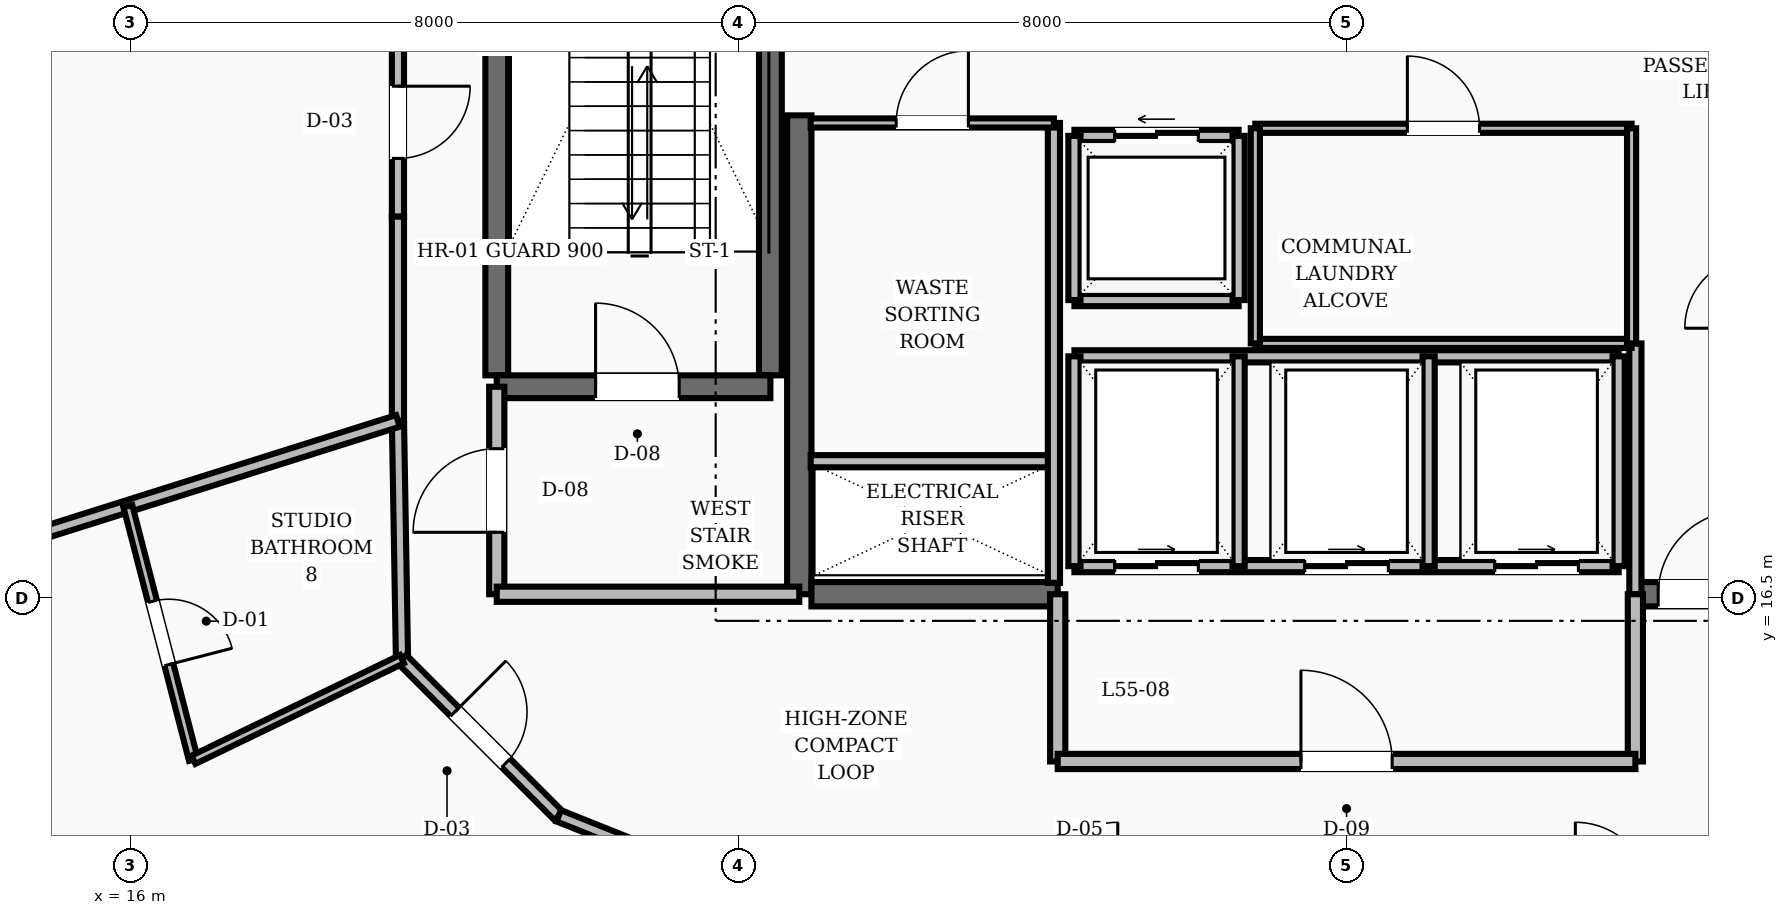
"""IFC4 building model, lengths in metres.
Left out: names, types, materials, properties, quantities, classifications, styles, units other than length and angle.
Written with IfcOpenShell. Run it as: python <this file> out.ifc"""

import sys

from ifc_helpers import new_model, si_unit, direction, frame, frame_2d, origin, place, context, subcontext, project, spatial, rectangle, extrude, element, fill, save


model = new_model("IFC4")
c1 = context("Model", 3, precision=1e-05, world=origin(), true_north=direction((0.0, 1.0)))
c2 = subcontext(c1, "Body", "Model", "MODEL_VIEW")
j1 = project(units=[si_unit("LENGTHUNIT", "METRE"), si_unit("PLANEANGLEUNIT", "RADIAN")], contexts=[c1])
p1 = place(None, origin())
s1 = spatial("IfcSite", under=j1, at=p1, CompositionType="ELEMENT")
p2 = place(p1, origin())
s2 = spatial("IfcBuilding", under=s1, at=p2, CompositionType="ELEMENT")
p3 = place(p2, frame((0.0, 0.0, 214.8)))
s3 = spatial("IfcBuildingStorey", under=s2, at=p3, CompositionType="ELEMENT", Elevation=214.8)
p4 = place(p3, frame((24.8, 16.55, 0.0), z_axis=(0.0, 0.0, 1.0), x_axis=(0.0, 1.0, 0.0)))
e1 = element("IfcWall", 1, at=p4, inside=s3, PredefinedType="SHEAR", context=c2, shape_type="SweptSolid", body=[
    extrude(rectangle(XDim=6.3, YDim=0.32, at=frame_2d((3.15, 0.0))), origin(), (0.0, 0.0, 1.0), 3.6),
])
p5 = place(p3, frame((24.96, 16.55, 0.0), z_axis=(0.0, 0.0, 1.0), x_axis=(1.0, 0.0, 0.0)))
e2 = element("IfcWall", 2, at=p5, inside=s3, PredefinedType="SHEAR", context=c2, shape_type="SweptSolid", body=[
    extrude(rectangle(XDim=3.24, YDim=0.32, at=frame_2d((1.62, 0.0))), origin(), (0.0, 0.0, 1.0), 3.6),
])
p6 = place(p3, frame((35.8, 16.55, 0.0), z_axis=(0.0, 0.0, 1.0), x_axis=(1.0, 0.0, 0.0)))
e3 = element("IfcWall", 3, at=p6, inside=s3, PredefinedType="SHEAR", context=c2, shape_type="SweptSolid", body=[
    extrude(rectangle(XDim=3.24, YDim=0.32, at=frame_2d((1.62, 0.0))), origin(), (0.0, 0.0, 1.0), 3.6),
])
p7 = place(p6, frame((0.3, 0.0, 0.0)))
e4 = element("IfcOpeningElement", 4, at=p7, cuts=e3, PredefinedType="OPENING", context=c2, shape_type="SweptSolid", body=[
    extrude(rectangle(XDim=1.1, YDim=2.1, at=frame_2d((0.55, 1.05))), frame((0.0, 0.17, 0.0), z_axis=(0.0, -1.0, 0.0), x_axis=(1.0, 0.0, 0.0)), (0.0, 0.0, 1.0), 0.34),
])
for number, where, z_axis, x_axis in (
    (5, (20.82, 19.43, 0.0), (0.0, 0.0, 1.0), (0.0, 1.0, 0.0)),
    (6, (24.42, 19.43, 0.0), (0.0, 0.0, 1.0), (0.0, 1.0, 0.0)),
):
    element("IfcWall", number, at=place(p3, frame(where, z_axis=z_axis, x_axis=x_axis)), inside=s3, PredefinedType="SHEAR", context=c2, shape_type="SweptSolid", body=[
        extrude(rectangle(XDim=8.74, YDim=0.3, at=frame_2d((4.37, 0.0))), origin(), (0.0, 0.0, 1.0), 3.6),
    ])
p8 = place(p3, frame((20.82, 19.28, 0.0), z_axis=(0.0, 0.0, 1.0), x_axis=(1.0, 0.0, 0.0)))
e7 = element("IfcWall", 7, at=p8, inside=s3, PredefinedType="SHEAR", context=c2, shape_type="SweptSolid", body=[
    extrude(rectangle(XDim=3.6, YDim=0.3, at=frame_2d((1.8, 0.0))), origin(), (0.0, 0.0, 1.0), 3.6),
])
p9 = place(p8, frame((1.3, 0.0, 0.0)))
e8 = element("IfcOpeningElement", 8, at=p9, cuts=e7, PredefinedType="OPENING", context=c2, shape_type="SweptSolid", body=[
    extrude(rectangle(XDim=1.1, YDim=2.1, at=frame_2d((0.55, 1.05))), frame((0.0, 0.16, 0.0), z_axis=(0.0, -1.0, 0.0), x_axis=(1.0, 0.0, 0.0)), (0.0, 0.0, 1.0), 0.32),
])
p10 = place(p3, frame((20.82, 16.55, 0.0), z_axis=(0.0, 0.0, 1.0), x_axis=(0.0, 1.0, 0.0)))
e9 = element("IfcWall", 9, at=p10, inside=s3, PredefinedType="SOLIDWALL", context=c2, shape_type="SweptSolid", body=[
    extrude(rectangle(XDim=2.73, YDim=0.2, at=frame_2d((1.365, 0.0))), origin(), (0.0, 0.0, 1.0), 2.87),
])
p11 = place(p10, frame((0.815, 0.0, 0.0)))
e10 = element("IfcOpeningElement", 10, at=p11, cuts=e9, PredefinedType="OPENING", context=c2, shape_type="SweptSolid", body=[
    extrude(rectangle(XDim=1.1, YDim=2.1, at=frame_2d((0.55, 1.05))), frame((0.0, 0.11, 0.0), z_axis=(0.0, -1.0, 0.0), x_axis=(1.0, 0.0, 0.0)), (0.0, 0.0, 1.0), 0.22),
])
p12 = place(p3, frame((20.82, 16.55, 0.0), z_axis=(0.0, 0.0, 1.0), x_axis=(1.0, 0.0, 0.0)))
e11 = element("IfcWall", 11, at=p12, inside=s3, PredefinedType="SOLIDWALL", context=c2, shape_type="SweptSolid", body=[
    extrude(rectangle(XDim=3.98, YDim=0.2, at=frame_2d((1.99, 0.0))), origin(), (0.0, 0.0, 1.0), 2.87),
])
p13 = place(p3, frame((35.8, 16.55, 0.0), z_axis=(0.0, 0.0, 1.0), x_axis=(0.0, 1.0, 0.0)))
e12 = element("IfcWall", 12, at=p13, inside=s3, PredefinedType="SOLIDWALL", context=c2, shape_type="SweptSolid", body=[
    extrude(rectangle(XDim=3.3, YDim=0.16, at=frame_2d((1.65, 0.0))), origin(), (0.0, 0.0, 1.0), 2.87),
])
for number, where, z_axis, x_axis in (
    (13, (28.2, 14.35, 0.0), (0.0, 0.0, 1.0), (0.0, 1.0, 0.0)),
    (14, (35.8, 14.35, 0.0), (0.0, 0.0, 1.0), (0.0, 1.0, 0.0)),
):
    element("IfcWall", number, at=place(p3, frame(where, z_axis=z_axis, x_axis=x_axis)), inside=s3, PredefinedType="SOLIDWALL", context=c2, shape_type="SweptSolid", body=[
        extrude(rectangle(XDim=2.2, YDim=0.2, at=frame_2d((1.1, 0.0))), origin(), (0.0, 0.0, 1.0), 2.87),
    ])
p14 = place(p3, frame((28.2, 14.35, 0.0), z_axis=(0.0, 0.0, 1.0), x_axis=(1.0, 0.0, 0.0)))
e15 = element("IfcWall", 15, at=p14, inside=s3, PredefinedType="SOLIDWALL", context=c2, shape_type="SweptSolid", body=[
    extrude(rectangle(XDim=7.6, YDim=0.2, at=frame_2d((3.8, 0.0))), origin(), (0.0, 0.0, 1.0), 2.87),
])
p15 = place(p14, frame((3.2, 0.0, 0.0)))
e16 = element("IfcOpeningElement", 16, at=p15, cuts=e15, PredefinedType="OPENING", context=c2, shape_type="SweptSolid", body=[
    extrude(rectangle(XDim=1.2, YDim=2.1, at=frame_2d((0.6, 1.05))), frame((0.0, 0.11, 0.0), z_axis=(0.0, -1.0, 0.0), x_axis=(1.0, 0.0, 0.0)), (0.0, 0.0, 1.0), 0.22),
])
p16 = place(p3, frame((28.42, 22.58, 0.0), z_axis=(0.0, 0.0, 1.0), x_axis=(1.0, 0.0, 0.0)))
e17 = element("IfcWall", 17, at=p16, inside=s3, PredefinedType="SOLIDWALL", context=c2, shape_type="SweptSolid", body=[
    extrude(rectangle(XDim=2.16, YDim=0.16, at=frame_2d((1.08, 0.0))), origin(), (0.0, 0.0, 1.0), 2.87),
])
p17 = place(p16, frame((0.53, 0.0, 0.0)))
e18 = element("IfcOpeningElement", 18, at=p17, cuts=e17, PredefinedType="OPENING", context=c2, shape_type="SweptSolid", body=[
    extrude(rectangle(XDim=1.1, YDim=2.15, at=frame_2d((0.55, 1.075))), frame((0.0, 0.09, 0.0), z_axis=(0.0, -1.0, 0.0), x_axis=(1.0, 0.0, 0.0)), (0.0, 0.0, 1.0), 0.18),
])
for number, where, z_axis, x_axis in (
    (19, (28.42, 20.42, 0.0), (0.0, 0.0, 1.0), (1.0, 0.0, 0.0)),
    (20, (28.42, 20.42, 0.0), (0.0, 0.0, 1.0), (0.0, 1.0, 0.0)),
    (21, (30.58, 20.42, 0.0), (0.0, 0.0, 1.0), (0.0, 1.0, 0.0)),
):
    element("IfcWall", number, at=place(p3, frame(where, z_axis=z_axis, x_axis=x_axis)), inside=s3, PredefinedType="SOLIDWALL", context=c2, shape_type="SweptSolid", body=[
        extrude(rectangle(XDim=2.16, YDim=0.16, at=frame_2d((1.08, 0.0))), origin(), (0.0, 0.0, 1.0), 2.87),
    ])
p18 = place(p3, frame((28.42, 16.92, 0.0), z_axis=(0.0, 0.0, 1.0), x_axis=(1.0, 0.0, 0.0)))
e22 = element("IfcWall", 22, at=p18, inside=s3, PredefinedType="SOLIDWALL", context=c2, shape_type="SweptSolid", body=[
    extrude(rectangle(XDim=7.16, YDim=0.16, at=frame_2d((3.58, 0.0))), origin(), (0.0, 0.0, 1.0), 2.87),
])
p19 = place(p18, frame((0.53, 0.0, 0.0)))
e23 = element("IfcOpeningElement", 23, at=p19, cuts=e22, PredefinedType="OPENING", context=c2, shape_type="SweptSolid", body=[
    extrude(rectangle(XDim=1.1, YDim=2.15, at=frame_2d((0.55, 1.075))), frame((0.0, 0.09, 0.0), z_axis=(0.0, -1.0, 0.0), x_axis=(1.0, 0.0, 0.0)), (0.0, 0.0, 1.0), 0.18),
])
p20 = place(p18, frame((3.03, 0.0, 0.0)))
e24 = element("IfcOpeningElement", 24, at=p20, cuts=e22, PredefinedType="OPENING", context=c2, shape_type="SweptSolid", body=[
    extrude(rectangle(XDim=1.1, YDim=2.15, at=frame_2d((0.55, 1.075))), frame((0.0, 0.09, 0.0), z_axis=(0.0, -1.0, 0.0), x_axis=(1.0, 0.0, 0.0)), (0.0, 0.0, 1.0), 0.18),
])
p21 = place(p18, frame((5.53, 0.0, 0.0)))
e25 = element("IfcOpeningElement", 25, at=p21, cuts=e22, PredefinedType="OPENING", context=c2, shape_type="SweptSolid", body=[
    extrude(rectangle(XDim=1.1, YDim=2.15, at=frame_2d((0.55, 1.075))), frame((0.0, 0.09, 0.0), z_axis=(0.0, -1.0, 0.0), x_axis=(1.0, 0.0, 0.0)), (0.0, 0.0, 1.0), 0.18),
])
p22 = place(p3, frame((28.42, 19.68, 0.0), z_axis=(0.0, 0.0, 1.0), x_axis=(1.0, 0.0, 0.0)))
e26 = element("IfcWall", 26, at=p22, inside=s3, PredefinedType="SOLIDWALL", context=c2, shape_type="SweptSolid", body=[
    extrude(rectangle(XDim=7.16, YDim=0.16, at=frame_2d((3.58, 0.0))), origin(), (0.0, 0.0, 1.0), 2.87),
])
for number, where, z_axis, x_axis in (
    (27, (28.42, 16.92, 0.0), (0.0, 0.0, 1.0), (0.0, 1.0, 0.0)),
    (28, (30.58, 16.92, 0.0), (0.0, 0.0, 1.0), (0.0, 1.0, 0.0)),
    (29, (33.08, 16.92, 0.0), (0.0, 0.0, 1.0), (0.0, 1.0, 0.0)),
    (30, (35.58, 16.92, 0.0), (0.0, 0.0, 1.0), (0.0, 1.0, 0.0)),
):
    element("IfcWall", number, at=place(p3, frame(where, z_axis=z_axis, x_axis=x_axis)), inside=s3, PredefinedType="SOLIDWALL", context=c2, shape_type="SweptSolid", body=[
        extrude(rectangle(XDim=2.76, YDim=0.16, at=frame_2d((1.38, 0.0))), origin(), (0.0, 0.0, 1.0), 2.87),
    ])
p23 = place(p3, frame((30.8, 22.68, 0.0), z_axis=(0.0, 0.0, 1.0), x_axis=(1.0, 0.0, 0.0)))
e31 = element("IfcWall", 31, at=p23, inside=s3, PredefinedType="PARTITIONING", context=c2, shape_type="SweptSolid", body=[
    extrude(rectangle(XDim=4.95, YDim=0.12, at=frame_2d((2.475, 0.0))), origin(), (0.0, 0.0, 1.0), 2.87),
])
p24 = place(p23, frame((2.0, 0.0, 0.0)))
e32 = element("IfcOpeningElement", 32, at=p24, cuts=e31, PredefinedType="OPENING", context=c2, shape_type="SweptSolid", body=[
    extrude(rectangle(XDim=0.95, YDim=2.1, at=frame_2d((0.475, 1.05))), frame((0.0, 0.07, 0.0), z_axis=(0.0, -1.0, 0.0), x_axis=(1.0, 0.0, 0.0)), (0.0, 0.0, 1.0), 0.14),
])
p25 = place(p3, frame((30.8, 19.85, 0.0), z_axis=(0.0, 0.0, 1.0), x_axis=(1.0, 0.0, 0.0)))
e33 = element("IfcWall", 33, at=p25, inside=s3, PredefinedType="PARTITIONING", context=c2, shape_type="SweptSolid", body=[
    extrude(rectangle(XDim=4.95, YDim=0.12, at=frame_2d((2.475, 0.0))), origin(), (0.0, 0.0, 1.0), 2.87),
])
for number, where, z_axis, x_axis in (
    (34, (30.8, 19.85, 0.0), (0.0, 0.0, 1.0), (0.0, 1.0, 0.0)),
    (35, (35.75, 19.85, 0.0), (0.0, 0.0, 1.0), (0.0, 1.0, 0.0)),
):
    element("IfcWall", number, at=place(p3, frame(where, z_axis=z_axis, x_axis=x_axis)), inside=s3, PredefinedType="PARTITIONING", context=c2, shape_type="SweptSolid", body=[
        extrude(rectangle(XDim=2.83, YDim=0.12, at=frame_2d((1.415, 0.0))), origin(), (0.0, 0.0, 1.0), 2.87),
    ])
p26 = place(p3, frame((24.95, 18.3, 0.0), z_axis=(0.0, 0.0, 1.0), x_axis=(1.0, 0.0, 0.0)))
e36 = element("IfcWall", 36, at=p26, inside=s3, PredefinedType="SOLIDWALL", context=c2, shape_type="SweptSolid", body=[
    extrude(rectangle(XDim=3.2, YDim=0.16, at=frame_2d((1.6, 0.0))), origin(), (0.0, 0.0, 1.0), 2.87),
])
p27 = place(p3, frame((28.15, 16.7, 0.0), z_axis=(0.0, 0.0, 1.0), x_axis=(0.0, 1.0, 0.0)))
e37 = element("IfcWall", 37, at=p27, inside=s3, PredefinedType="SOLIDWALL", context=c2, shape_type="SweptSolid", body=[
    extrude(rectangle(XDim=6.05, YDim=0.16, at=frame_2d((3.025, 0.0))), origin(), (0.0, 0.0, 1.0), 2.87),
])
p28 = place(p3, frame((24.95, 22.75, 0.0), z_axis=(0.0, 0.0, 1.0), x_axis=(1.0, 0.0, 0.0)))
e38 = element("IfcWall", 38, at=p28, inside=s3, PredefinedType="PARTITIONING", context=c2, shape_type="SweptSolid", body=[
    extrude(rectangle(XDim=3.2, YDim=0.12, at=frame_2d((1.6, 0.0))), origin(), (0.0, 0.0, 1.0), 2.87),
])
p29 = place(p28, frame((1.125, 0.0, 0.0)))
e39 = element("IfcOpeningElement", 39, at=p29, cuts=e38, PredefinedType="OPENING", context=c2, shape_type="SweptSolid", body=[
    extrude(rectangle(XDim=0.95, YDim=2.1, at=frame_2d((0.475, 1.05))), frame((0.0, 0.07, 0.0), z_axis=(0.0, -1.0, 0.0), x_axis=(1.0, 0.0, 0.0)), (0.0, 0.0, 1.0), 0.14),
])
p30 = place(p3, frame((19.52, 24.0, 0.0), z_axis=(0.0, 0.0, 1.0), x_axis=(0.0, -1.0, 0.0)))
e40 = element("IfcWall", 40, at=p30, inside=s3, PredefinedType="SOLIDWALL", context=c2, shape_type="SweptSolid", body=[
    extrude(rectangle(XDim=2.482, YDim=0.16, at=frame_2d((1.241, 0.0))), origin(), (0.0, 0.0, 1.0), 2.87),
])
p31 = place(p30, frame((0.766, 0.0, 0.0)))
e41 = element("IfcOpeningElement", 41, at=p31, cuts=e40, PredefinedType="OPENING", context=c2, shape_type="SweptSolid", body=[
    extrude(rectangle(XDim=0.95, YDim=2.1, at=frame_2d((0.475, 1.05))), frame((0.0, 0.09, 0.0), z_axis=(0.0, -1.0, 0.0), x_axis=(1.0, 0.0, 0.0)), (0.0, 0.0, 1.0), 0.18),
])
p32 = place(p3, frame((19.52, 21.518, 0.0), z_axis=(0.0, 0.0, 1.0), x_axis=(0.0, -1.0, 0.0)))
e42 = element("IfcWall", 42, at=p32, inside=s3, PredefinedType="SOLIDWALL", context=c2, shape_type="SweptSolid", body=[
    extrude(rectangle(XDim=2.687, YDim=0.16, at=frame_2d((1.344, 0.0))), origin(), (0.0, 0.0, 1.0), 2.87),
])
p33 = place(p3, frame((19.52, 18.831, 0.0), z_axis=(0.0, 0.0, 1.0), x_axis=(0.016981035134, -0.999855811828, 0.0)))
e43 = element("IfcWall", 43, at=p33, inside=s3, PredefinedType="SOLIDWALL", context=c2, shape_type="SweptSolid", body=[
    extrude(rectangle(XDim=3.134, YDim=0.16, at=frame_2d((1.567, 0.0))), origin(), (0.0, 0.0, 1.0), 2.87),
])
p34 = place(p3, frame((19.573, 15.697, 0.0), z_axis=(0.0, 0.0, 1.0), x_axis=(0.707106781187, -0.707106781187, 0.0)))
e44 = element("IfcWall", 44, at=p34, inside=s3, PredefinedType="SOLIDWALL", context=c2, shape_type="SweptSolid", body=[
    extrude(rectangle(XDim=2.916, YDim=0.16, at=frame_2d((1.458, 0.0))), origin(), (0.0, 0.0, 1.0), 2.87),
])
p35 = place(p34, frame((0.983, 0.0, 0.0)))
e45 = element("IfcOpeningElement", 45, at=p35, cuts=e44, PredefinedType="OPENING", context=c2, shape_type="SweptSolid", body=[
    extrude(rectangle(XDim=0.95, YDim=2.1, at=frame_2d((0.475, 1.05))), frame((0.0, 0.09, 0.0), z_axis=(0.0, -1.0, 0.0), x_axis=(1.0, 0.0, 0.0)), (0.0, 0.0, 1.0), 0.18),
])
p36 = place(p3, frame((21.635, 13.635, 0.0), z_axis=(0.0, 0.0, 1.0), x_axis=(0.92856882165, -0.371160266542, 0.0)))
e46 = element("IfcWall", 46, at=p36, inside=s3, PredefinedType="SOLIDWALL", context=c2, shape_type="SweptSolid", body=[
    extrude(rectangle(XDim=2.923, YDim=0.16, at=frame_2d((1.461, 0.0))), origin(), (0.0, 0.0, 1.0), 2.87),
])
p37 = place(p3, frame((19.52, 18.831, 0.0), z_axis=(0.0, 0.0, 1.0), x_axis=(-0.953655254227, -0.300901405921, 0.0)))
e47 = element("IfcWall", 47, at=p37, inside=s3, PredefinedType="SOLIDWALL", context=c2, shape_type="SweptSolid", body=[
    extrude(rectangle(XDim=9.756, YDim=0.16, at=frame_2d((4.878, 0.0))), origin(), (0.0, 0.0, 1.0), 2.87),
])
p38 = place(p3, frame((15.967, 17.709, 0.0), z_axis=(0.0, 0.0, 1.0), x_axis=(0.250327875267, -0.968161120302, 0.0)))
e48 = element("IfcWall", 48, at=p38, inside=s3, PredefinedType="PARTITIONING", context=c2, shape_type="SweptSolid", body=[
    extrude(rectangle(XDim=3.447, YDim=0.12, at=frame_2d((1.723, 0.0))), origin(), (0.0, 0.0, 1.0), 2.87),
])
p39 = place(p38, frame((1.293, 0.0, 0.0)))
e49 = element("IfcOpeningElement", 49, at=p39, cuts=e48, PredefinedType="OPENING", context=c2, shape_type="SweptSolid", body=[
    extrude(rectangle(XDim=0.86, YDim=2.1, at=frame_2d((0.43, 1.05))), frame((0.0, 0.07, 0.0), z_axis=(0.0, -1.0, 0.0), x_axis=(1.0, 0.0, 0.0)), (0.0, 0.0, 1.0), 0.14),
])
p40 = place(p3, frame((19.573, 15.697, 0.0), z_axis=(0.0, 0.0, 1.0), x_axis=(-0.900574352632, -0.434702007565, 0.0)))
e50 = element("IfcWall", 50, at=p40, inside=s3, PredefinedType="PARTITIONING", context=c2, shape_type="SweptSolid", body=[
    extrude(rectangle(XDim=3.047, YDim=0.12, at=frame_2d((1.523, 0.0))), origin(), (0.0, 0.0, 1.0), 2.87),
])
p41 = place(p9, origin())
e51 = element("IfcDoor", 51, at=p41, inside=s3, OperationType="SINGLE_SWING_LEFT", PredefinedType="DOOR", context=c2, shape_type="SweptSolid", body=[
    extrude(rectangle(XDim=1.1, YDim=2.1, at=frame_2d((0.55, 1.05))), frame((0.0, 0.025, 0.0), z_axis=(0.0, -1.0, 0.0), x_axis=(1.0, 0.0, 0.0)), (0.0, 0.0, 1.0), 0.05),
])
fill(e8, e51)
p42 = place(p11, origin())
e52 = element("IfcDoor", 52, at=p42, inside=s3, OperationType="SINGLE_SWING_LEFT", PredefinedType="DOOR", context=c2, shape_type="SweptSolid", body=[
    extrude(rectangle(XDim=1.1, YDim=2.1, at=frame_2d((0.55, 1.05))), frame((0.0, 0.025, 0.0), z_axis=(0.0, -1.0, 0.0), x_axis=(1.0, 0.0, 0.0)), (0.0, 0.0, 1.0), 0.05),
])
fill(e10, e52)
p43 = place(p7, origin())
e53 = element("IfcDoor", 53, at=p43, inside=s3, OperationType="SINGLE_SWING_RIGHT", PredefinedType="DOOR", context=c2, shape_type="SweptSolid", body=[
    extrude(rectangle(XDim=1.1, YDim=2.1, at=frame_2d((0.55, 1.05))), frame((0.0, 0.025, 0.0), z_axis=(0.0, -1.0, 0.0), x_axis=(1.0, 0.0, 0.0)), (0.0, 0.0, 1.0), 0.05),
])
fill(e4, e53)
p44 = place(p15, origin())
e54 = element("IfcDoor", 54, at=p44, inside=s3, OperationType="SINGLE_SWING_LEFT", PredefinedType="DOOR", context=c2, shape_type="SweptSolid", body=[
    extrude(rectangle(XDim=1.2, YDim=2.1, at=frame_2d((0.6, 1.05))), frame((0.0, 0.025, 0.0), z_axis=(0.0, -1.0, 0.0), x_axis=(1.0, 0.0, 0.0)), (0.0, 0.0, 1.0), 0.05),
])
fill(e16, e54)
p45 = place(p17, origin())
e55 = element("IfcDoor", 55, at=p45, inside=s3, OperationType="SLIDING_TO_LEFT", PredefinedType="DOOR", context=c2, shape_type="SweptSolid", body=[
    extrude(rectangle(XDim=1.1, YDim=2.15, at=frame_2d((0.55, 1.075))), frame((0.0, 0.025, 0.0), z_axis=(0.0, -1.0, 0.0), x_axis=(1.0, 0.0, 0.0)), (0.0, 0.0, 1.0), 0.05),
])
fill(e18, e55)
p46 = place(p19, origin())
e56 = element("IfcDoor", 56, at=p46, inside=s3, OperationType="SLIDING_TO_RIGHT", PredefinedType="DOOR", context=c2, shape_type="SweptSolid", body=[
    extrude(rectangle(XDim=1.1, YDim=2.15, at=frame_2d((0.55, 1.075))), frame((0.0, 0.025, 0.0), z_axis=(0.0, -1.0, 0.0), x_axis=(1.0, 0.0, 0.0)), (0.0, 0.0, 1.0), 0.05),
])
fill(e23, e56)
p47 = place(p20, origin())
e57 = element("IfcDoor", 57, at=p47, inside=s3, OperationType="SLIDING_TO_RIGHT", PredefinedType="DOOR", context=c2, shape_type="SweptSolid", body=[
    extrude(rectangle(XDim=1.1, YDim=2.15, at=frame_2d((0.55, 1.075))), frame((0.0, 0.025, 0.0), z_axis=(0.0, -1.0, 0.0), x_axis=(1.0, 0.0, 0.0)), (0.0, 0.0, 1.0), 0.05),
])
fill(e24, e57)
p48 = place(p21, origin())
e58 = element("IfcDoor", 58, at=p48, inside=s3, OperationType="SLIDING_TO_RIGHT", PredefinedType="DOOR", context=c2, shape_type="SweptSolid", body=[
    extrude(rectangle(XDim=1.1, YDim=2.15, at=frame_2d((0.55, 1.075))), frame((0.0, 0.025, 0.0), z_axis=(0.0, -1.0, 0.0), x_axis=(1.0, 0.0, 0.0)), (0.0, 0.0, 1.0), 0.05),
])
fill(e25, e58)
p49 = place(p24, origin())
e59 = element("IfcDoor", 59, at=p49, inside=s3, OperationType="SINGLE_SWING_LEFT", PredefinedType="DOOR", context=c2, shape_type="SweptSolid", body=[
    extrude(rectangle(XDim=0.95, YDim=2.1, at=frame_2d((0.475, 1.05))), frame((0.0, 0.025, 0.0), z_axis=(0.0, -1.0, 0.0), x_axis=(1.0, 0.0, 0.0)), (0.0, 0.0, 1.0), 0.05),
])
fill(e32, e59)
p50 = place(p29, origin())
e60 = element("IfcDoor", 60, at=p50, inside=s3, OperationType="SINGLE_SWING_RIGHT", PredefinedType="DOOR", context=c2, shape_type="SweptSolid", body=[
    extrude(rectangle(XDim=0.95, YDim=2.1, at=frame_2d((0.475, 1.05))), frame((0.0, 0.025, 0.0), z_axis=(0.0, -1.0, 0.0), x_axis=(1.0, 0.0, 0.0)), (0.0, 0.0, 1.0), 0.05),
])
fill(e39, e60)
p51 = place(p31, origin())
e61 = element("IfcDoor", 61, at=p51, inside=s3, OperationType="SINGLE_SWING_LEFT", PredefinedType="DOOR", context=c2, shape_type="SweptSolid", body=[
    extrude(rectangle(XDim=0.95, YDim=2.1, at=frame_2d((0.475, 1.05))), frame((0.0, 0.025, 0.0), z_axis=(0.0, -1.0, 0.0), x_axis=(1.0, 0.0, 0.0)), (0.0, 0.0, 1.0), 0.05),
])
fill(e41, e61)
p52 = place(p39, origin())
e62 = element("IfcDoor", 62, at=p52, inside=s3, OperationType="SINGLE_SWING_RIGHT", PredefinedType="DOOR", context=c2, shape_type="SweptSolid", body=[
    extrude(rectangle(XDim=0.86, YDim=2.1, at=frame_2d((0.43, 1.05))), frame((0.0, 0.025, 0.0), z_axis=(0.0, -1.0, 0.0), x_axis=(1.0, 0.0, 0.0)), (0.0, 0.0, 1.0), 0.05),
])
fill(e49, e62)
p53 = place(p35, origin())
e63 = element("IfcDoor", 63, at=p53, inside=s3, OperationType="SINGLE_SWING_LEFT", PredefinedType="DOOR", context=c2, shape_type="SweptSolid", body=[
    extrude(rectangle(XDim=0.95, YDim=2.1, at=frame_2d((0.475, 1.05))), frame((0.0, 0.025, 0.0), z_axis=(0.0, -1.0, 0.0), x_axis=(1.0, 0.0, 0.0)), (0.0, 0.0, 1.0), 0.05),
])
fill(e45, e63)
save(model, sys.argv[1])
